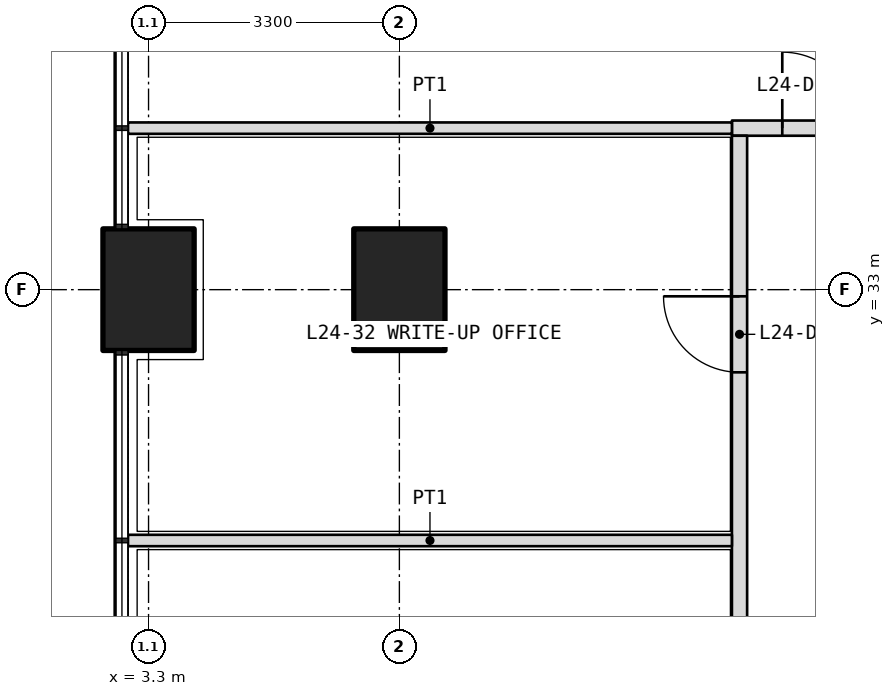
"""IFC4 building model, lengths in metres.
Left out: names, types, materials, properties, quantities, classifications, styles, units other than length and angle.
Written with IfcOpenShell. Run it as: python <this file> out.ifc"""

import sys

from ifc_helpers import new_model, si_unit, direction, frame, frame_2d, origin, origin_2d, place, context, subcontext, project, spatial, rectangle, extrude, element, fill, save


model = new_model("IFC4")
c1 = context("Model", 3, precision=1e-05, world=origin(), true_north=direction((0.0, 1.0)))
c2 = subcontext(c1, "Body", "Model", "MODEL_VIEW")
j1 = project(units=[si_unit("LENGTHUNIT", "METRE"), si_unit("PLANEANGLEUNIT", "RADIAN")], contexts=[c1])
p1 = place(None, origin())
s1 = spatial("IfcSite", under=j1, at=p1, CompositionType="ELEMENT")
p2 = place(p1, origin())
s2 = spatial("IfcBuilding", under=s1, at=p2, CompositionType="ELEMENT")
p3 = place(p2, frame((0.0, 0.0, 107.4)))
s3 = spatial("IfcBuildingStorey", under=s2, at=p3, CompositionType="ELEMENT", Elevation=107.4)
for number, where, z_axis, x_axis in (
    (1, (3.3, 33.0, 0.0), (0.0, 0.0, 1.0), (0.0, 1.0, 0.0)),
    (2, (6.6, 33.0, 0.0), (0.0, 0.0, 1.0), (0.0, 1.0, 0.0)),
):
    element("IfcColumn", number, at=place(p3, frame(where, z_axis=z_axis, x_axis=x_axis)), inside=s3, PredefinedType="COLUMN", context=c2, shape_type="SweptSolid", body=[
        extrude(rectangle(XDim=1.6, YDim=1.2, at=origin_2d()), origin(), (0.0, 0.0, 1.0), 4.2),
    ])
p4 = place(p3, frame((10.975, 35.125, 0.0), z_axis=(0.0, 0.0, 1.0), x_axis=(1.0, 0.0, 0.0)))
e3 = element("IfcWall", 3, at=p4, inside=s3, PredefinedType="PARTITIONING", context=c2, shape_type="SweptSolid", body=[
    extrude(rectangle(XDim=25.325, YDim=0.2, at=frame_2d((12.663, 0.0))), origin(), (0.0, 0.0, 1.0), 2.85),
])
p5 = place(p4, frame((0.663, 0.0, 0.0)))
e4 = element("IfcOpeningElement", 4, at=p5, cuts=e3, PredefinedType="OPENING", context=c2, shape_type="SweptSolid", body=[
    extrude(rectangle(XDim=1.0, YDim=2.1, at=frame_2d((0.5, 1.05))), frame((0.0, 0.11, 0.0), z_axis=(0.0, -1.0, 0.0), x_axis=(1.0, 0.0, 0.0)), (0.0, 0.0, 1.0), 0.22),
])
p6 = place(p4, frame((3.425, 0.0, 0.0)))
e5 = element("IfcOpeningElement", 5, at=p6, cuts=e3, PredefinedType="OPENING", context=c2, shape_type="SweptSolid", body=[
    extrude(rectangle(XDim=1.0, YDim=2.1, at=frame_2d((0.5, 1.05))), frame((0.0, 0.11, 0.0), z_axis=(0.0, -1.0, 0.0), x_axis=(1.0, 0.0, 0.0)), (0.0, 0.0, 1.0), 0.22),
])
p7 = place(p4, frame((6.725, 0.0, 0.0)))
e6 = element("IfcOpeningElement", 6, at=p7, cuts=e3, PredefinedType="OPENING", context=c2, shape_type="SweptSolid", body=[
    extrude(rectangle(XDim=1.0, YDim=2.1, at=frame_2d((0.5, 1.05))), frame((0.0, 0.11, 0.0), z_axis=(0.0, -1.0, 0.0), x_axis=(1.0, 0.0, 0.0)), (0.0, 0.0, 1.0), 0.22),
])
p8 = place(p4, frame((11.525, 0.0, 0.0)))
e7 = element("IfcOpeningElement", 7, at=p8, cuts=e3, PredefinedType="OPENING", context=c2, shape_type="SweptSolid", body=[
    extrude(rectangle(XDim=1.2, YDim=2.1, at=frame_2d((0.6, 1.05))), frame((0.0, 0.11, 0.0), z_axis=(0.0, -1.0, 0.0), x_axis=(1.0, 0.0, 0.0)), (0.0, 0.0, 1.0), 0.22),
])
p9 = place(p4, frame((19.775, 0.0, 0.0)))
e8 = element("IfcOpeningElement", 8, at=p9, cuts=e3, PredefinedType="OPENING", context=c2, shape_type="SweptSolid", body=[
    extrude(rectangle(XDim=1.2, YDim=2.1, at=frame_2d((0.6, 1.05))), frame((0.0, 0.11, 0.0), z_axis=(0.0, -1.0, 0.0), x_axis=(1.0, 0.0, 0.0)), (0.0, 0.0, 1.0), 0.22),
])
p10 = place(p3, frame((11.075, 7.4, 0.0), z_axis=(0.0, 0.0, 1.0), x_axis=(0.0, 1.0, 0.0)))
e9 = element("IfcWall", 9, at=p10, inside=s3, PredefinedType="PARTITIONING", context=c2, shape_type="SweptSolid", body=[
    extrude(rectangle(XDim=27.625, YDim=0.2, at=frame_2d((13.812, 0.0))), origin(), (0.0, 0.0, 1.0), 2.85),
])
p11 = place(p10, frame((2.35, 0.0, 0.0)))
e10 = element("IfcOpeningElement", 10, at=p11, cuts=e9, PredefinedType="OPENING", context=c2, shape_type="SweptSolid", body=[
    extrude(rectangle(XDim=1.0, YDim=2.1, at=frame_2d((0.5, 1.05))), frame((0.0, 0.11, 0.0), z_axis=(0.0, -1.0, 0.0), x_axis=(1.0, 0.0, 0.0)), (0.0, 0.0, 1.0), 0.22),
])
p12 = place(p10, frame((6.35, 0.0, 0.0)))
e11 = element("IfcOpeningElement", 11, at=p12, cuts=e9, PredefinedType="OPENING", context=c2, shape_type="SweptSolid", body=[
    extrude(rectangle(XDim=1.0, YDim=2.1, at=frame_2d((0.5, 1.05))), frame((0.0, 0.11, 0.0), z_axis=(0.0, -1.0, 0.0), x_axis=(1.0, 0.0, 0.0)), (0.0, 0.0, 1.0), 0.22),
])
p13 = place(p10, frame((9.4, 0.0, 0.0)))
e12 = element("IfcOpeningElement", 12, at=p13, cuts=e9, PredefinedType="OPENING", context=c2, shape_type="SweptSolid", body=[
    extrude(rectangle(XDim=0.9, YDim=2.1, at=frame_2d((0.45, 1.05))), frame((0.0, 0.11, 0.0), z_axis=(0.0, -1.0, 0.0), x_axis=(1.0, 0.0, 0.0)), (0.0, 0.0, 1.0), 0.22),
])
p14 = place(p10, frame((13.2, 0.0, 0.0)))
e13 = element("IfcOpeningElement", 13, at=p14, cuts=e9, PredefinedType="OPENING", context=c2, shape_type="SweptSolid", body=[
    extrude(rectangle(XDim=0.9, YDim=2.1, at=frame_2d((0.45, 1.05))), frame((0.0, 0.11, 0.0), z_axis=(0.0, -1.0, 0.0), x_axis=(1.0, 0.0, 0.0)), (0.0, 0.0, 1.0), 0.22),
])
p15 = place(p10, frame((16.75, 0.0, 0.0)))
e14 = element("IfcOpeningElement", 14, at=p15, cuts=e9, PredefinedType="OPENING", context=c2, shape_type="SweptSolid", body=[
    extrude(rectangle(XDim=1.0, YDim=2.1, at=frame_2d((0.5, 1.05))), frame((0.0, 0.11, 0.0), z_axis=(0.0, -1.0, 0.0), x_axis=(1.0, 0.0, 0.0)), (0.0, 0.0, 1.0), 0.22),
])
p16 = place(p10, frame((20.15, 0.0, 0.0)))
e15 = element("IfcOpeningElement", 15, at=p16, cuts=e9, PredefinedType="OPENING", context=c2, shape_type="SweptSolid", body=[
    extrude(rectangle(XDim=1.0, YDim=2.1, at=frame_2d((0.5, 1.05))), frame((0.0, 0.11, 0.0), z_axis=(0.0, -1.0, 0.0), x_axis=(1.0, 0.0, 0.0)), (0.0, 0.0, 1.0), 0.22),
])
p17 = place(p10, frame((24.512, 0.0, 0.0)))
e16 = element("IfcOpeningElement", 16, at=p17, cuts=e9, PredefinedType="OPENING", context=c2, shape_type="SweptSolid", body=[
    extrude(rectangle(XDim=1.0, YDim=2.1, at=frame_2d((0.5, 1.05))), frame((0.0, 0.11, 0.0), z_axis=(0.0, -1.0, 0.0), x_axis=(1.0, 0.0, 0.0)), (0.0, 0.0, 1.0), 0.22),
])
for number, where, z_axis, x_axis in (
    (17, (3.03, 35.125, 0.0), (0.0, 0.0, 1.0), (1.0, 0.0, 0.0)),
    (18, (3.03, 29.7, 0.0), (0.0, 0.0, 1.0), (1.0, 0.0, 0.0)),
):
    element("IfcWall", number, at=place(p3, frame(where, z_axis=z_axis, x_axis=x_axis)), inside=s3, PredefinedType="PARTITIONING", context=c2, shape_type="SweptSolid", body=[
        extrude(rectangle(XDim=7.945, YDim=0.15, at=frame_2d((3.973, 0.0))), origin(), (0.0, 0.0, 1.0), 2.7),
    ])
p18 = place(p5, origin())
e19 = element("IfcDoor", 19, at=p18, inside=s3, OperationType="SINGLE_SWING_LEFT", PredefinedType="DOOR", context=c2, shape_type="SweptSolid", body=[
    extrude(rectangle(XDim=1.0, YDim=2.1, at=frame_2d((0.5, 1.05))), frame((0.0, 0.025, 0.0), z_axis=(0.0, -1.0, 0.0), x_axis=(1.0, 0.0, 0.0)), (0.0, 0.0, 1.0), 0.05),
])
fill(e4, e19)
p19 = place(p17, origin())
e20 = element("IfcDoor", 20, at=p19, inside=s3, OperationType="SINGLE_SWING_RIGHT", PredefinedType="DOOR", context=c2, shape_type="SweptSolid", body=[
    extrude(rectangle(XDim=1.0, YDim=2.1, at=frame_2d((0.5, 1.05))), frame((0.0, 0.025, 0.0), z_axis=(0.0, -1.0, 0.0), x_axis=(1.0, 0.0, 0.0)), (0.0, 0.0, 1.0), 0.05),
])
fill(e16, e20)
save(model, sys.argv[1])
